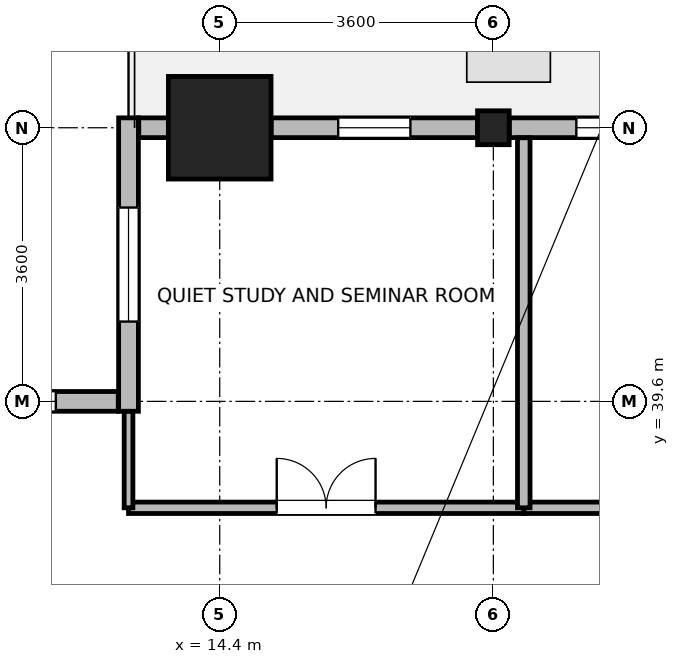
"""IFC4 building model, lengths in metres.
Left out: names, types, materials, properties, quantities, classifications, styles, units other than length and angle.
Written with IfcOpenShell. Run it as: python <this file> out.ifc"""

import sys

from ifc_helpers import new_model, si_unit, direction, frame, frame_2d, origin, origin_2d, place, context, subcontext, project, spatial, rectangle, i_section, extrude, source, transform, mapped, element, fill, save


model = new_model("IFC4")
c1 = context("Model", 3, precision=1e-05, world=origin(), true_north=direction((0.0, 1.0)))
c2 = subcontext(c1, "Body", "Model", "MODEL_VIEW")
j1 = project(units=[si_unit("LENGTHUNIT", "METRE"), si_unit("PLANEANGLEUNIT", "RADIAN")], contexts=[c1])
p1 = place(None, origin())
s1 = spatial("IfcSite", under=j1, at=p1, CompositionType="ELEMENT")
p2 = place(p1, origin())
s2 = spatial("IfcBuilding", under=s1, at=p2, CompositionType="ELEMENT")
p3 = place(p2, frame((0.0, 0.0, 62.3)))
s3 = spatial("IfcBuildingStorey", under=s2, at=p3, CompositionType="ELEMENT", Elevation=62.3)
m1 = source(origin(), c2, "Body", "SweptSolid", [
    extrude(rectangle(XDim=1.35, YDim=1.35, at=origin_2d()), origin(), (0.0, 0.0, 1.0), 3.7),
])
p4 = place(p3, frame((14.4, 43.2, 0.0), z_axis=(0.0, 0.0, 1.0), x_axis=(1.0, 0.0, 0.0)))
e1 = element("IfcColumn", 1, at=p4, inside=s3, PredefinedType="COLUMN", context=c2, shape_type="MappedRepresentation", body=[
    mapped(m1, transform((0.0, 0.0, 0.0), x_axis=(1.0, 0.0, 0.0), y_axis=(0.0, 1.0, 0.0), z_axis=(0.0, 0.0, 1.0), scale=1.0)),
])
m2 = source(origin(), c2, "Body", "SweptSolid", [
    extrude(i_section(OverallWidth=0.416, OverallDepth=0.446, WebThickness=0.029, FlangeThickness=0.04, FilletRadius=0.015, at=origin_2d()), origin(), (0.0, 0.0, 1.0), 3.7),
])
p5 = place(p3, frame((18.0, 43.2, 0.0), z_axis=(0.0, 0.0, 1.0), x_axis=(1.0, 0.0, 0.0)))
e2 = element("IfcColumn", 2, at=p5, inside=s3, PredefinedType="COLUMN", context=c2, shape_type="MappedRepresentation", body=[
    mapped(m2, transform((0.0, 0.0, 0.0), x_axis=(1.0, 0.0, 0.0), y_axis=(0.0, 1.0, 0.0), z_axis=(0.0, 0.0, 1.0), scale=1.0)),
])
p6 = place(p3, frame((18.209, 43.2, 0.0), z_axis=(0.0, 0.0, 1.0), x_axis=(1.0, 0.0, 0.0)))
e3 = element("IfcWall", 3, at=p6, inside=s3, PredefinedType="STANDARD", context=c2, shape_type="SweptSolid", body=[
    extrude(rectangle(XDim=2.715, YDim=0.26, at=frame_2d((1.357, 0.0))), origin(), (0.0, 0.0, 1.0), 2.93),
])
p7 = place(p6, frame((0.883, 0.0, 0.85)))
e4 = element("IfcOpeningElement", 4, at=p7, cuts=e3, PredefinedType="OPENING", context=c2, shape_type="SweptSolid", body=[
    extrude(rectangle(XDim=0.95, YDim=1.75, at=frame_2d((0.475, 0.875))), frame((0.0, 0.14, 0.0), z_axis=(0.0, -1.0, 0.0), x_axis=(1.0, 0.0, 0.0)), (0.0, 0.0, 1.0), 0.28),
])
p8 = place(p3, frame((15.076, 43.2, 0.0), z_axis=(0.0, 0.0, 1.0), x_axis=(1.0, 0.0, 0.0)))
e5 = element("IfcWall", 5, at=p8, inside=s3, PredefinedType="STANDARD", context=c2, shape_type="SweptSolid", body=[
    extrude(rectangle(XDim=2.715, YDim=0.26, at=frame_2d((1.357, 0.0))), origin(), (0.0, 0.0, 1.0), 2.93),
])
p9 = place(p8, frame((0.883, 0.0, 0.85)))
e6 = element("IfcOpeningElement", 6, at=p9, cuts=e5, PredefinedType="OPENING", context=c2, shape_type="SweptSolid", body=[
    extrude(rectangle(XDim=0.95, YDim=1.75, at=frame_2d((0.475, 0.875))), frame((0.0, 0.14, 0.0), z_axis=(0.0, -1.0, 0.0), x_axis=(1.0, 0.0, 0.0)), (0.0, 0.0, 1.0), 0.28),
])
p10 = place(p3, frame((13.335, 43.2, 0.0), z_axis=(0.0, 0.0, 1.0), x_axis=(1.0, 0.0, 0.0)))
e7 = element("IfcWall", 7, at=p10, inside=s3, PredefinedType="STANDARD", context=c2, shape_type="SweptSolid", body=[
    extrude(rectangle(XDim=0.389, YDim=0.26, at=frame_2d((0.195, 0.0))), origin(), (0.0, 0.0, 1.0), 3.43),
])
p11 = place(p3, frame((13.2, 39.47, 0.0), z_axis=(0.0, 0.0, 1.0), x_axis=(0.0, 1.0, 0.0)))
e8 = element("IfcWall", 8, at=p11, inside=s3, PredefinedType="STANDARD", context=c2, shape_type="SweptSolid", body=[
    extrude(rectangle(XDim=3.86, YDim=0.26, at=frame_2d((1.93, 0.0))), origin(), (0.0, 0.0, 1.0), 3.43),
])
p12 = place(p11, frame((1.18, 0.0, 0.85)))
e9 = element("IfcOpeningElement", 9, at=p12, cuts=e8, PredefinedType="OPENING", context=c2, shape_type="SweptSolid", body=[
    extrude(rectangle(XDim=1.5, YDim=1.85, at=frame_2d((0.75, 0.925))), frame((0.0, 0.14, 0.0), z_axis=(0.0, -1.0, 0.0), x_axis=(1.0, 0.0, 0.0)), (0.0, 0.0, 1.0), 0.28),
])
p13 = place(p3, frame((3.637, 39.6, 0.0), z_axis=(0.0, 0.0, 1.0), x_axis=(1.0, 0.0, 0.0)))
e10 = element("IfcWall", 10, at=p13, inside=s3, PredefinedType="STANDARD", context=c2, shape_type="SweptSolid", body=[
    extrude(rectangle(XDim=9.428, YDim=0.26, at=frame_2d((4.714, 0.0))), origin(), (0.0, 0.0, 1.0), 3.43),
])
p14 = place(p13, frame((0.821, 0.0, 0.85)))
e11 = element("IfcOpeningElement", 11, at=p14, cuts=e10, PredefinedType="OPENING", context=c2, shape_type="SweptSolid", body=[
    extrude(rectangle(XDim=1.5, YDim=1.85, at=frame_2d((0.75, 0.925))), frame((0.0, 0.14, 0.0), z_axis=(0.0, -1.0, 0.0), x_axis=(1.0, 0.0, 0.0)), (0.0, 0.0, 1.0), 0.28),
])
p15 = place(p13, frame((3.964, 0.0, 0.85)))
e12 = element("IfcOpeningElement", 12, at=p15, cuts=e10, PredefinedType="OPENING", context=c2, shape_type="SweptSolid", body=[
    extrude(rectangle(XDim=1.5, YDim=1.85, at=frame_2d((0.75, 0.925))), frame((0.0, 0.14, 0.0), z_axis=(0.0, -1.0, 0.0), x_axis=(1.0, 0.0, 0.0)), (0.0, 0.0, 1.0), 0.28),
])
p16 = place(p13, frame((7.107, 0.0, 0.85)))
e13 = element("IfcOpeningElement", 13, at=p16, cuts=e10, PredefinedType="OPENING", context=c2, shape_type="SweptSolid", body=[
    extrude(rectangle(XDim=1.5, YDim=1.85, at=frame_2d((0.75, 0.925))), frame((0.0, 0.14, 0.0), z_axis=(0.0, -1.0, 0.0), x_axis=(1.0, 0.0, 0.0)), (0.0, 0.0, 1.0), 0.28),
])
p17 = place(p3, frame((18.4, 38.2, 0.0), z_axis=(0.0, 0.0, 1.0), x_axis=(1.0, 0.0, 0.0)))
e14 = element("IfcWall", 14, at=p17, inside=s3, PredefinedType="PARTITIONING", context=c2, shape_type="SweptSolid", body=[
    extrude(rectangle(XDim=6.12, YDim=0.15, at=frame_2d((3.06, 0.0))), origin(), (0.0, 0.0, 1.0), 3.43),
])
p18 = place(p17, frame((2.41, 0.0, 0.0)))
e15 = element("IfcOpeningElement", 15, at=p18, cuts=e14, PredefinedType="OPENING", context=c2, shape_type="SweptSolid", body=[
    extrude(rectangle(XDim=1.3, YDim=2.12, at=frame_2d((0.65, 1.06))), frame((0.0, 0.085, 0.0), z_axis=(0.0, -1.0, 0.0), x_axis=(1.0, 0.0, 0.0)), (0.0, 0.0, 1.0), 0.17),
])
p19 = place(p3, frame((13.2, 38.2, 0.0), z_axis=(0.0, 0.0, 1.0), x_axis=(1.0, 0.0, 0.0)))
e16 = element("IfcWall", 16, at=p19, inside=s3, PredefinedType="PARTITIONING", context=c2, shape_type="SweptSolid", body=[
    extrude(rectangle(XDim=5.2, YDim=0.15, at=frame_2d((2.6, 0.0))), origin(), (0.0, 0.0, 1.0), 3.43),
])
p20 = place(p19, frame((1.95, 0.0, 0.0)))
e17 = element("IfcOpeningElement", 17, at=p20, cuts=e16, PredefinedType="OPENING", context=c2, shape_type="SweptSolid", body=[
    extrude(rectangle(XDim=1.3, YDim=2.12, at=frame_2d((0.65, 1.06))), frame((0.0, 0.085, 0.0), z_axis=(0.0, -1.0, 0.0), x_axis=(1.0, 0.0, 0.0)), (0.0, 0.0, 1.0), 0.17),
])
p21 = place(p3, frame((13.2, 38.2, 0.0), z_axis=(0.0, 0.0, 1.0), x_axis=(0.0, 1.0, 0.0)))
e18 = element("IfcWall", 18, at=p21, inside=s3, PredefinedType="PARTITIONING", context=c2, shape_type="SweptSolid", body=[
    extrude(rectangle(XDim=1.268, YDim=0.115, at=frame_2d((0.634, 0.0))), origin(), (0.0, 0.0, 1.0), 3.43),
])
p22 = place(p3, frame((18.4, 38.2, 0.0), z_axis=(0.0, 0.0, 1.0), x_axis=(0.0, 1.0, 0.0)))
e19 = element("IfcWall", 19, at=p22, inside=s3, PredefinedType="PARTITIONING", context=c2, shape_type="SweptSolid", body=[
    extrude(rectangle(XDim=4.868, YDim=0.165, at=frame_2d((2.434, 0.0))), origin(), (0.0, 0.0, 1.0), 3.43),
])
p23 = place(p7, origin())
e20 = element("IfcWindow", 20, at=p23, inside=s3, PartitioningType="SINGLE_PANEL", PredefinedType="WINDOW", context=c2, shape_type="SweptSolid", body=[
    extrude(rectangle(XDim=0.95, YDim=1.75, at=frame_2d((0.475, 0.875))), frame((0.0, 0.03, 0.0), z_axis=(0.0, -1.0, 0.0), x_axis=(1.0, 0.0, 0.0)), (0.0, 0.0, 1.0), 0.06),
])
fill(e4, e20)
p24 = place(p9, origin())
e21 = element("IfcWindow", 21, at=p24, inside=s3, PartitioningType="SINGLE_PANEL", PredefinedType="WINDOW", context=c2, shape_type="SweptSolid", body=[
    extrude(rectangle(XDim=0.95, YDim=1.75, at=frame_2d((0.475, 0.875))), frame((0.0, 0.03, 0.0), z_axis=(0.0, -1.0, 0.0), x_axis=(1.0, 0.0, 0.0)), (0.0, 0.0, 1.0), 0.06),
])
fill(e6, e21)
p25 = place(p12, origin())
e22 = element("IfcWindow", 22, at=p25, inside=s3, PartitioningType="SINGLE_PANEL", PredefinedType="WINDOW", context=c2, shape_type="SweptSolid", body=[
    extrude(rectangle(XDim=1.5, YDim=1.85, at=frame_2d((0.75, 0.925))), frame((0.0, 0.03, 0.0), z_axis=(0.0, -1.0, 0.0), x_axis=(1.0, 0.0, 0.0)), (0.0, 0.0, 1.0), 0.06),
])
fill(e9, e22)
p26 = place(p16, origin())
e23 = element("IfcWindow", 23, at=p26, inside=s3, PartitioningType="SINGLE_PANEL", PredefinedType="WINDOW", context=c2, shape_type="SweptSolid", body=[
    extrude(rectangle(XDim=1.5, YDim=1.85, at=frame_2d((0.75, 0.925))), frame((0.0, 0.03, 0.0), z_axis=(0.0, -1.0, 0.0), x_axis=(1.0, 0.0, 0.0)), (0.0, 0.0, 1.0), 0.06),
])
fill(e13, e23)
p27 = place(p20, origin())
e24 = element("IfcDoor", 24, at=p27, inside=s3, OperationType="DOUBLE_DOOR_SINGLE_SWING", PredefinedType="DOOR", context=c2, shape_type="SweptSolid", body=[
    extrude(rectangle(XDim=1.3, YDim=2.12, at=frame_2d((0.65, 1.06))), frame((0.0, 0.025, 0.0), z_axis=(0.0, -1.0, 0.0), x_axis=(1.0, 0.0, 0.0)), (0.0, 0.0, 1.0), 0.05),
])
fill(e17, e24)
save(model, sys.argv[1])
